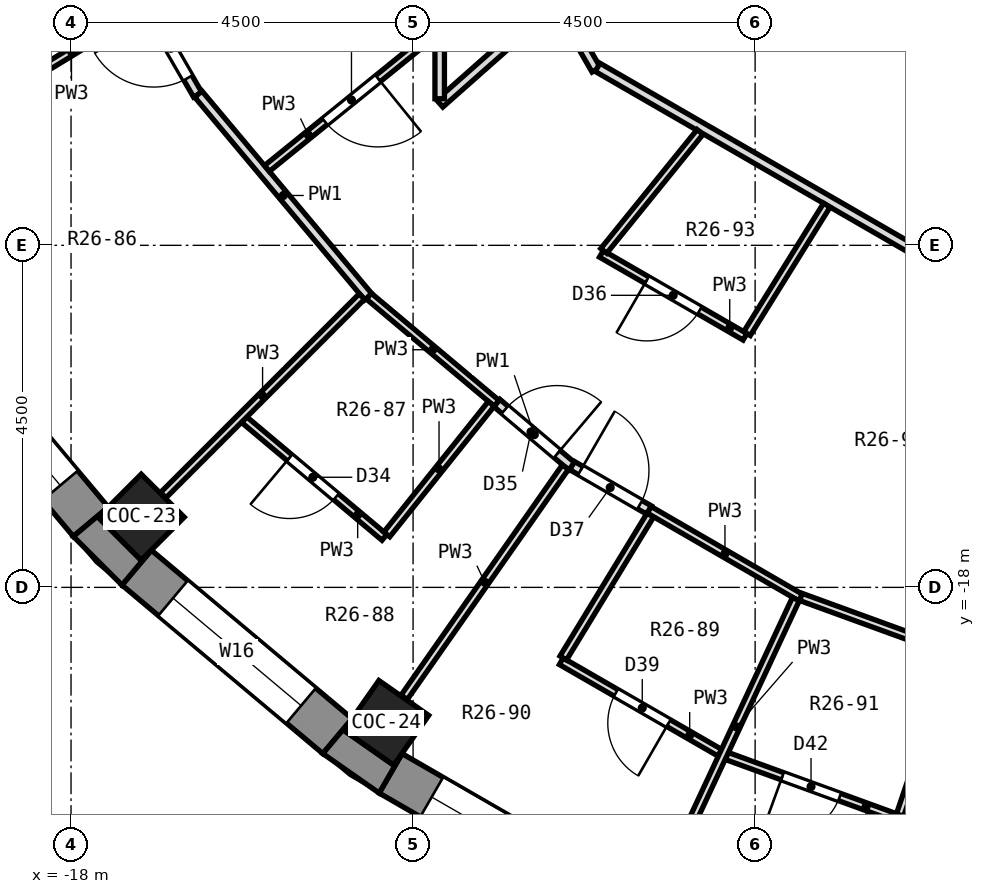
"""IFC4 building model, lengths in metres.
Left out: names, types, materials, properties, quantities, classifications, styles, units other than length and angle.
Written with IfcOpenShell. Run it as: python <this file> out.ifc"""

import sys

from ifc_helpers import new_model, si_unit, direction, frame, frame_2d, origin, origin_2d, place, context, subcontext, project, spatial, polyline, rectangle, outline, extrude, element, fill, save


model = new_model("IFC4")
c1 = context("Model", 3, precision=1e-05, world=origin(), true_north=direction((0.0, 1.0)))
c2 = subcontext(c1, "Body", "Model", "MODEL_VIEW")
j1 = project(units=[si_unit("LENGTHUNIT", "METRE"), si_unit("PLANEANGLEUNIT", "RADIAN")], contexts=[c1])
p1 = place(None, origin())
s1 = spatial("IfcSite", under=j1, at=p1, CompositionType="ELEMENT")
p2 = place(p1, origin())
s2 = spatial("IfcBuilding", under=s1, at=p2, CompositionType="ELEMENT")
p3 = place(p2, frame((0.0, 0.0, 170.7)))
s3 = spatial("IfcBuildingStorey", under=s2, at=p3, CompositionType="ELEMENT", Elevation=170.7)
for number, where, z_axis, x_axis in (
    (1, (-17.077, -17.077, 0.0), (0.0, 0.0, 1.0), (-0.707, -0.707, 0.0)),
    (2, (-13.852, -19.782, 0.0), (0.0, 0.0, 1.0), (-0.574, -0.819, 0.0)),
):
    element("IfcColumn", number, at=place(p3, frame(where, z_axis=z_axis, x_axis=x_axis)), inside=s3, PredefinedType="COLUMN", context=c2, shape_type="SweptSolid", body=[
        extrude(rectangle(XDim=0.8, YDim=0.8, at=origin_2d()), origin(), (0.0, 0.0, 1.0), 3.3),
    ])
p4 = place(p3, frame((-19.957, -14.494, 0.0), z_axis=(0.0, 0.0, 1.0), x_axis=(0.642770398358, -0.766058884809, 0.0)))
e3 = element("IfcWall", 3, at=p4, inside=s3, PredefinedType="SOLIDWALL", context=c2, shape_type="SweptSolid", body=[
    extrude(rectangle(XDim=3.449, YDim=0.6, at=frame_2d((1.725, 0.0))), origin(), (0.0, 0.0, 1.0), 2.85),
])
p5 = place(p4, frame((0.625, 0.0, 0.9)))
e4 = element("IfcOpeningElement", 4, at=p5, cuts=e3, PredefinedType="OPENING", context=c2, shape_type="SweptSolid", body=[
    extrude(rectangle(XDim=2.2, YDim=1.8, at=frame_2d((1.1, 0.9))), frame((0.0, 0.312, 0.0), z_axis=(0.0, -1.0, 0.0), x_axis=(1.0, 0.0, 0.0)), (0.0, 0.0, 1.0), 0.624),
])
p6 = place(p3, frame((-17.137, -17.74, 0.0), z_axis=(0.0, 0.0, 1.0), x_axis=(0.766058884809, -0.642770398358, 0.0)))
e5 = element("IfcWall", 5, at=p6, inside=s3, PredefinedType="SOLIDWALL", context=c2, shape_type="SweptSolid", body=[
    extrude(rectangle(XDim=3.449, YDim=0.6, at=frame_2d((1.725, 0.0))), origin(), (0.0, 0.0, 1.0), 2.85),
])
p7 = place(p6, frame((0.625, 0.0, 0.9)))
e6 = element("IfcOpeningElement", 6, at=p7, cuts=e5, PredefinedType="OPENING", context=c2, shape_type="SweptSolid", body=[
    extrude(rectangle(XDim=2.2, YDim=1.8, at=frame_2d((1.1, 0.9))), frame((0.0, 0.312, 0.0), z_axis=(0.0, -1.0, 0.0), x_axis=(1.0, 0.0, 0.0)), (0.0, 0.0, 1.0), 0.624),
])
p8 = place(p3, frame((-13.796, -20.446, 0.0), z_axis=(0.0, 0.0, 1.0), x_axis=(0.86602648383, -0.499998129301, 0.0)))
e7 = element("IfcWall", 7, at=p8, inside=s3, PredefinedType="SOLIDWALL", context=c2, shape_type="SweptSolid", body=[
    extrude(rectangle(XDim=3.45, YDim=0.6, at=frame_2d((1.725, 0.0))), origin(), (0.0, 0.0, 1.0), 2.85),
])
p9 = place(p8, frame((0.625, 0.0, 0.9)))
e8 = element("IfcOpeningElement", 8, at=p9, cuts=e7, PredefinedType="OPENING", context=c2, shape_type="SweptSolid", body=[
    extrude(rectangle(XDim=2.2, YDim=1.8, at=frame_2d((1.1, 0.9))), frame((0.0, 0.312, 0.0), z_axis=(0.0, -1.0, 0.0), x_axis=(1.0, 0.0, 0.0)), (0.0, 0.0, 1.0), 0.624),
])
p10 = place(p3, origin())
e9 = element("IfcWall", 9, at=p10, inside=s3, PredefinedType="SOLIDWALL", context=c2, shape_type="SweptSolid", body=[
    extrude(outline(polyline([(-17.33, -17.969), (-16.944, -17.51), (-17.077, -17.642), (-17.642, -17.077), (-17.51, -16.944), (-17.969, -17.33), (-17.33, -17.969)])), origin(), (0.0, 0.0, 1.0), 2.85),
])
p11 = place(p3, origin())
e10 = element("IfcWall", 10, at=p11, inside=s3, PredefinedType="SOLIDWALL", context=c2, shape_type="SweptSolid", body=[
    extrude(outline(polyline([(-14.687, -20.187), (-13.946, -20.706), (-13.646, -20.186), (-13.754, -20.34), (-14.409, -19.881), (-14.302, -19.727), (-14.687, -20.187)])), origin(), (0.0, 0.0, 1.0), 2.85),
])
p12 = place(p3, frame((-17.038, -10.299, 0.0), z_axis=(0.0, 0.0, 1.0), x_axis=(0.500147619332, -0.865940158947, 0.0)))
e11 = element("IfcWall", 11, at=p12, inside=s3, PredefinedType="PARTITIONING", context=c2, shape_type="SweptSolid", body=[
    extrude(rectangle(XDim=1.408, YDim=0.125, at=frame_2d((0.704, 0.0))), origin(), (0.0, 0.0, 1.0), 2.85),
])
p13 = place(p12, frame((0.253, 0.0, 0.0)))
e12 = element("IfcOpeningElement", 12, at=p13, cuts=e11, PredefinedType="OPENING", context=c2, shape_type="SweptSolid", body=[
    extrude(rectangle(XDim=0.9, YDim=2.1, at=frame_2d((0.45, 1.05))), frame((0.0, 0.074, 0.0), z_axis=(0.0, -1.0, 0.0), x_axis=(1.0, 0.0, 0.0)), (0.0, 0.0, 1.0), 0.149),
])
p14 = place(p3, frame((-11.617, -10.278, 0.0), z_axis=(0.0, 0.0, 1.0), x_axis=(0.499956751108, -0.866050372104, 0.0)))
e13 = element("IfcWall", 13, at=p14, inside=s3, PredefinedType="PARTITIONING", context=c2, shape_type="SweptSolid", body=[
    extrude(rectangle(XDim=1.052, YDim=0.125, at=frame_2d((0.526, 0.0))), origin(), (0.0, 0.0, 1.0), 2.85),
])
p15 = place(p3, frame((-16.325, -11.511, 0.0), z_axis=(0.0, 0.0, 1.0), x_axis=(0.642416987395, -0.766355279428, 0.0)))
e14 = element("IfcWall", 14, at=p15, inside=s3, PredefinedType="PARTITIONING", context=c2, shape_type="SweptSolid", body=[
    extrude(rectangle(XDim=3.481, YDim=0.125, at=frame_2d((1.74, 0.0))), origin(), (0.0, 0.0, 1.0), 2.85),
])
p16 = place(p3, frame((-12.398, -15.574, 0.0), z_axis=(0.0, 0.0, 1.0), x_axis=(0.763379112729, -0.645950718128, 0.0)))
e15 = element("IfcWall", 15, at=p16, inside=s3, PredefinedType="PARTITIONING", context=c2, shape_type="SweptSolid", body=[
    extrude(rectangle(XDim=1.291, YDim=0.125, at=frame_2d((0.646, 0.0))), origin(), (0.0, 0.0, 1.0), 2.85),
])
p17 = place(p16, frame((0.139, 0.0, 0.0)))
e16 = element("IfcOpeningElement", 16, at=p17, cuts=e15, PredefinedType="OPENING", context=c2, shape_type="SweptSolid", body=[
    extrude(rectangle(XDim=0.9, YDim=2.1, at=frame_2d((0.45, 1.05))), frame((0.0, 0.074, 0.0), z_axis=(0.0, -1.0, 0.0), x_axis=(1.0, 0.0, 0.0)), (0.0, 0.0, 1.0), 0.149),
])
p18 = place(p3, frame((-15.723, -15.793, 0.0), z_axis=(0.0, 0.0, 1.0), x_axis=(0.766024146731, -0.642811797204, 0.0)))
e17 = element("IfcWall", 17, at=p18, inside=s3, PredefinedType="PARTITIONING", context=c2, shape_type="SweptSolid", body=[
    extrude(rectangle(XDim=2.409, YDim=0.1, at=frame_2d((1.205, 0.0))), origin(), (0.0, 0.0, 1.0), 2.85),
])
p19 = place(p18, frame((0.78, 0.0, 0.0)))
e18 = element("IfcOpeningElement", 18, at=p19, cuts=e17, PredefinedType="OPENING", context=c2, shape_type="SweptSolid", body=[
    extrude(rectangle(XDim=0.8, YDim=2.1, at=frame_2d((0.4, 1.05))), frame((0.0, 0.062, 0.0), z_axis=(0.0, -1.0, 0.0), x_axis=(1.0, 0.0, 0.0)), (0.0, 0.0, 1.0), 0.124),
])
p20 = place(p3, frame((-14.081, -14.169, 0.0), z_axis=(0.0, 0.0, 1.0), x_axis=(0.766108401036, -0.642711379907, 0.0)))
e19 = element("IfcWall", 19, at=p20, inside=s3, PredefinedType="PARTITIONING", context=c2, shape_type="SweptSolid", body=[
    extrude(rectangle(XDim=2.192, YDim=0.1, at=frame_2d((1.096, 0.0))), origin(), (0.0, 0.0, 1.0), 2.85),
])
p21 = place(p3, frame((-10.395, -16.979, 0.0), z_axis=(0.0, 0.0, 1.0), x_axis=(0.86526186487, -0.501320162373, 0.0)))
e20 = element("IfcWall", 20, at=p21, inside=s3, PredefinedType="PARTITIONING", context=c2, shape_type="SweptSolid", body=[
    extrude(rectangle(XDim=2.305, YDim=0.1, at=frame_2d((1.152, 0.0))), origin(), (0.0, 0.0, 1.0), 2.85),
])
p22 = place(p3, frame((-11.55, -18.972, 0.0), z_axis=(0.0, 0.0, 1.0), x_axis=(0.866140030745, -0.499801407703, 0.0)))
e21 = element("IfcWall", 21, at=p22, inside=s3, PredefinedType="PARTITIONING", context=c2, shape_type="SweptSolid", body=[
    extrude(rectangle(XDim=2.409, YDim=0.1, at=frame_2d((1.205, 0.0))), origin(), (0.0, 0.0, 1.0), 2.85),
])
p23 = place(p22, frame((0.83, 0.0, 0.0)))
e22 = element("IfcOpeningElement", 22, at=p23, cuts=e21, PredefinedType="OPENING", context=c2, shape_type="SweptSolid", body=[
    extrude(rectangle(XDim=0.8, YDim=2.1, at=frame_2d((0.4, 1.05))), frame((0.0, 0.062, 0.0), z_axis=(0.0, -1.0, 0.0), x_axis=(1.0, 0.0, 0.0)), (0.0, 0.0, 1.0), 0.124),
])
p24 = place(p3, frame((-11.407, -16.398, 0.0), z_axis=(0.0, 0.0, 1.0), x_axis=(0.865955664968, -0.500120771724, 0.0)))
e23 = element("IfcWall", 23, at=p24, inside=s3, PredefinedType="PARTITIONING", context=c2, shape_type="SweptSolid", body=[
    extrude(rectangle(XDim=1.167, YDim=0.125, at=frame_2d((0.583, 0.0))), origin(), (0.0, 0.0, 1.0), 2.85),
])
p25 = place(p24, frame((0.127, 0.0, 0.0)))
e24 = element("IfcOpeningElement", 24, at=p25, cuts=e23, PredefinedType="OPENING", context=c2, shape_type="SweptSolid", body=[
    extrude(rectangle(XDim=0.9, YDim=2.1, at=frame_2d((0.45, 1.05))), frame((0.0, 0.074, 0.0), z_axis=(0.0, -1.0, 0.0), x_axis=(1.0, 0.0, 0.0)), (0.0, 0.0, 1.0), 0.149),
])
p26 = place(p3, frame((-11.023, -13.612, 0.0), z_axis=(0.0, 0.0, 1.0), x_axis=(0.86608684879, -0.499893559023, 0.0)))
e25 = element("IfcWall", 25, at=p26, inside=s3, PredefinedType="PARTITIONING", context=c2, shape_type="SweptSolid", body=[
    extrude(rectangle(XDim=2.182, YDim=0.1, at=frame_2d((1.091, 0.0))), origin(), (0.0, 0.0, 1.0), 2.85),
])
p27 = place(p26, frame((0.691, 0.0, 0.0)))
e26 = element("IfcOpeningElement", 26, at=p27, cuts=e25, PredefinedType="OPENING", context=c2, shape_type="SweptSolid", body=[
    extrude(rectangle(XDim=0.8, YDim=2.1, at=frame_2d((0.4, 1.05))), frame((0.0, 0.062, 0.0), z_axis=(0.0, -1.0, 0.0), x_axis=(1.0, 0.0, 0.0)), (0.0, 0.0, 1.0), 0.124),
])
p28 = place(p3, frame((-11.073, -11.158, 0.0), z_axis=(0.0, 0.0, 1.0), x_axis=(0.865999621737, -0.500044653157, 0.0)))
e27 = element("IfcWall", 27, at=p28, inside=s3, PredefinedType="PARTITIONING", context=c2, shape_type="SweptSolid", body=[
    extrude(rectangle(XDim=8.155, YDim=0.125, at=frame_2d((4.078, 0.0))), origin(), (0.0, 0.0, 1.0), 2.85),
])
p29 = place(p28, frame((5.302, 0.0, 0.0)))
e28 = element("IfcOpeningElement", 28, at=p29, cuts=e27, PredefinedType="OPENING", context=c2, shape_type="SweptSolid", body=[
    extrude(rectangle(XDim=1.0, YDim=2.1, at=frame_2d((0.5, 1.05))), frame((0.0, 0.074, 0.0), z_axis=(0.0, -1.0, 0.0), x_axis=(1.0, 0.0, 0.0)), (0.0, 0.0, 1.0), 0.149),
])
p30 = place(p3, frame((-9.17, -9.255, 0.0), z_axis=(0.0, 0.0, 1.0), x_axis=(0.866034433151, -0.499984360352, 0.0)))
e29 = element("IfcWall", 29, at=p30, inside=s3, PredefinedType="PARTITIONING", context=c2, shape_type="SweptSolid", body=[
    extrude(rectangle(XDim=4.842, YDim=0.125, at=frame_2d((2.421, 0.0))), origin(), (0.0, 0.0, 1.0), 2.85),
])
p31 = place(p30, frame((2.763, 0.0, 0.0)))
e30 = element("IfcOpeningElement", 30, at=p31, cuts=e29, PredefinedType="OPENING", context=c2, shape_type="SweptSolid", body=[
    extrude(rectangle(XDim=1.0, YDim=2.1, at=frame_2d((0.5, 1.05))), frame((0.0, 0.074, 0.0), z_axis=(0.0, -1.0, 0.0), x_axis=(1.0, 0.0, 0.0)), (0.0, 0.0, 1.0), 0.149),
])
p32 = place(p3, frame((-9.373, -20.218, 0.0), z_axis=(0.0, 0.0, 1.0), x_axis=(0.939707598657, -0.34197898916, 0.0)))
e31 = element("IfcWall", 31, at=p32, inside=s3, PredefinedType="PARTITIONING", context=c2, shape_type="SweptSolid", body=[
    extrude(rectangle(XDim=2.409, YDim=0.1, at=frame_2d((1.205, 0.0))), origin(), (0.0, 0.0, 1.0), 2.85),
])
p33 = place(p32, frame((0.78, 0.0, 0.0)))
e32 = element("IfcOpeningElement", 32, at=p33, cuts=e31, PredefinedType="OPENING", context=c2, shape_type="SweptSolid", body=[
    extrude(rectangle(XDim=0.8, YDim=2.1, at=frame_2d((0.4, 1.05))), frame((0.0, 0.062, 0.0), z_axis=(0.0, -1.0, 0.0), x_axis=(1.0, 0.0, 0.0)), (0.0, 0.0, 1.0), 0.124),
])
p34 = place(p3, frame((-8.397, -18.126, 0.0), z_axis=(0.0, 0.0, 1.0), x_axis=(0.939676937302, -0.342063230271, 0.0)))
e33 = element("IfcWall", 33, at=p34, inside=s3, PredefinedType="PARTITIONING", context=c2, shape_type="SweptSolid", body=[
    extrude(rectangle(XDim=2.204, YDim=0.1, at=frame_2d((1.102, 0.0))), origin(), (0.0, 0.0, 1.0), 2.85),
])
p35 = place(p3, frame((-18.928, -11.523, 0.0), z_axis=(0.0, 0.0, 1.0), x_axis=(0.854045436393, 0.520198416545, 0.0)))
e34 = element("IfcWall", 34, at=p35, inside=s3, PredefinedType="PARTITIONING", context=c2, shape_type="SweptSolid", body=[
    extrude(rectangle(XDim=2.187, YDim=0.1, at=frame_2d((1.093, 0.0))), origin(), (0.0, 0.0, 1.0), 2.85),
])
p36 = place(p3, frame((-15.422, -12.489, 0.0), z_axis=(0.0, 0.0, 1.0), x_axis=(0.777201155745, 0.629252225669, 0.0)))
e35 = element("IfcWall", 35, at=p36, inside=s3, PredefinedType="PARTITIONING", context=c2, shape_type="SweptSolid", body=[
    extrude(rectangle(XDim=2.861, YDim=0.1, at=frame_2d((1.431, 0.0))), origin(), (0.0, 0.0, 1.0), 2.85),
])
p37 = place(p36, frame((0.981, 0.0, 0.0)))
e36 = element("IfcOpeningElement", 36, at=p37, cuts=e35, PredefinedType="OPENING", context=c2, shape_type="SweptSolid", body=[
    extrude(rectangle(XDim=0.9, YDim=2.1, at=frame_2d((0.45, 1.05))), frame((0.0, 0.062, 0.0), z_axis=(0.0, -1.0, 0.0), x_axis=(1.0, 0.0, 0.0)), (0.0, 0.0, 1.0), 0.124),
])
p38 = place(p3, frame((-13.15, -11.634, 0.0), z_axis=(0.0, 0.0, 1.0), x_axis=(0.748975424904, 0.662597776098, 0.0)))
e37 = element("IfcWall", 37, at=p38, inside=s3, PredefinedType="PARTITIONING", context=c2, shape_type="SweptSolid", body=[
    extrude(rectangle(XDim=1.984, YDim=0.125, at=frame_2d((0.992, 0.0))), origin(), (0.0, 0.0, 1.0), 2.85),
])
p39 = place(p3, frame((-16.787, -16.787, 0.0), z_axis=(0.0, 0.0, 1.0), x_axis=(0.707106781187, 0.707106781187, 0.0)))
e38 = element("IfcWall", 38, at=p39, inside=s3, PredefinedType="PARTITIONING", context=c2, shape_type="SweptSolid", body=[
    extrude(rectangle(XDim=3.696, YDim=0.1, at=frame_2d((1.848, 0.0))), origin(), (0.0, 0.0, 1.0), 2.85),
])
p40 = place(p3, frame((-10.991, -13.573, 0.0), z_axis=(0.0, 0.0, 1.0), x_axis=(0.629327284659, 0.777140379072, 0.0)))
e39 = element("IfcWall", 39, at=p40, inside=s3, PredefinedType="PARTITIONING", context=c2, shape_type="SweptSolid", body=[
    extrude(rectangle(XDim=2.013, YDim=0.1, at=frame_2d((1.007, 0.0))), origin(), (0.0, 0.0, 1.0), 2.85),
])
p41 = place(p3, frame((-13.846, -17.303, 0.0), z_axis=(0.0, 0.0, 1.0), x_axis=(0.624722111344, 0.780847157642, 0.0)))
e40 = element("IfcWall", 40, at=p41, inside=s3, PredefinedType="PARTITIONING", context=c2, shape_type="SweptSolid", body=[
    extrude(rectangle(XDim=2.2, YDim=0.1, at=frame_2d((1.1, 0.0))), origin(), (0.0, 0.0, 1.0), 2.85),
])
p42 = place(p3, frame((-13.617, -19.447, 0.0), z_axis=(0.0, 0.0, 1.0), x_axis=(0.573515531974, 0.819194686619, 0.0)))
e41 = element("IfcWall", 41, at=p42, inside=s3, PredefinedType="PARTITIONING", context=c2, shape_type="SweptSolid", body=[
    extrude(rectangle(XDim=3.697, YDim=0.1, at=frame_2d((1.848, 0.0))), origin(), (0.0, 0.0, 1.0), 2.85),
])
p43 = place(p3, frame((-9.107, -14.661, 0.0), z_axis=(0.0, 0.0, 1.0), x_axis=(0.528010719156, 0.849237705508, 0.0)))
e42 = element("IfcWall", 42, at=p43, inside=s3, PredefinedType="PARTITIONING", context=c2, shape_type="SweptSolid", body=[
    extrude(rectangle(XDim=1.988, YDim=0.1, at=frame_2d((0.994, 0.0))), origin(), (0.0, 0.0, 1.0), 2.85),
])
p44 = place(p3, frame((-11.524, -18.929, 0.0), z_axis=(0.0, 0.0, 1.0), x_axis=(0.520291802012, 0.853988548377, 0.0)))
e43 = element("IfcWall", 43, at=p44, inside=s3, PredefinedType="PARTITIONING", context=c2, shape_type="SweptSolid", body=[
    extrude(rectangle(XDim=2.201, YDim=0.1, at=frame_2d((1.1, 0.0))), origin(), (0.0, 0.0, 1.0), 2.85),
])
p45 = place(p3, frame((-10.034, -21.515, 0.0), z_axis=(0.0, 0.0, 1.0), x_axis=(0.423040405982, 0.906110818226, 0.0)))
e44 = element("IfcWall", 44, at=p45, inside=s3, PredefinedType="PARTITIONING", context=c2, shape_type="SweptSolid", body=[
    extrude(rectangle(XDim=3.709, YDim=0.1, at=frame_2d((1.854, 0.0))), origin(), (0.0, 0.0, 1.0), 2.85),
])
p46 = place(p3, frame((-7.093, -20.995, 0.0), z_axis=(0.0, 0.0, 1.0), x_axis=(0.320053851591, 0.947399351953, 0.0)))
e45 = element("IfcWall", 45, at=p46, inside=s3, PredefinedType="PARTITIONING", context=c2, shape_type="SweptSolid", body=[
    extrude(rectangle(XDim=2.2, YDim=0.1, at=frame_2d((1.1, 0.0))), origin(), (0.0, 0.0, 1.0), 2.85),
])
p47 = place(p3, frame((-13.15, -11.572, 0.0), z_axis=(0.0, 0.0, 1.0), x_axis=(0.0, 1.0, 0.0)))
e46 = element("IfcWall", 46, at=p47, inside=s3, PredefinedType="PARTITIONING", context=c2, shape_type="SweptSolid", body=[
    extrude(rectangle(XDim=2.221, YDim=0.125, at=frame_2d((1.111, 0.0))), origin(), (0.0, 0.0, 1.0), 2.85),
])
p48 = place(p5, origin())
e47 = element("IfcWindow", 47, at=p48, inside=s3, PartitioningType="SINGLE_PANEL", PredefinedType="WINDOW", context=c2, shape_type="SweptSolid", body=[
    extrude(rectangle(XDim=2.2, YDim=1.8, at=frame_2d((1.1, 0.9))), frame((0.0, 0.18, 0.0), z_axis=(0.0, -1.0, 0.0), x_axis=(1.0, 0.0, 0.0)), (0.0, 0.0, 1.0), 0.06),
])
fill(e4, e47)
p49 = place(p7, origin())
e48 = element("IfcWindow", 48, at=p49, inside=s3, PartitioningType="SINGLE_PANEL", PredefinedType="WINDOW", context=c2, shape_type="SweptSolid", body=[
    extrude(rectangle(XDim=2.2, YDim=1.8, at=frame_2d((1.1, 0.9))), frame((0.0, 0.18, 0.0), z_axis=(0.0, -1.0, 0.0), x_axis=(1.0, 0.0, 0.0)), (0.0, 0.0, 1.0), 0.06),
])
fill(e6, e48)
p50 = place(p9, origin())
e49 = element("IfcWindow", 49, at=p50, inside=s3, PartitioningType="SINGLE_PANEL", PredefinedType="WINDOW", context=c2, shape_type="SweptSolid", body=[
    extrude(rectangle(XDim=2.2, YDim=1.8, at=frame_2d((1.1, 0.9))), frame((0.0, 0.18, 0.0), z_axis=(0.0, -1.0, 0.0), x_axis=(1.0, 0.0, 0.0)), (0.0, 0.0, 1.0), 0.06),
])
fill(e8, e49)
p51 = place(p13, frame((0.9, 0.0, 0.0), z_axis=(0.0, 0.0, 1.0), x_axis=(-1.0, 0.0, 0.0)))
e50 = element("IfcDoor", 50, at=p51, inside=s3, OperationType="SINGLE_SWING_RIGHT", PredefinedType="DOOR", context=c2, shape_type="SweptSolid", body=[
    extrude(rectangle(XDim=0.9, YDim=2.1, at=frame_2d((0.45, 1.05))), frame((0.0, 0.025, 0.0), z_axis=(0.0, -1.0, 0.0), x_axis=(1.0, 0.0, 0.0)), (0.0, 0.0, 1.0), 0.05),
])
fill(e12, e50)
p52 = place(p37, frame((0.9, 0.0, 0.0), z_axis=(0.0, 0.0, 1.0), x_axis=(-1.0, 0.0, 0.0)))
e51 = element("IfcDoor", 51, at=p52, inside=s3, OperationType="SINGLE_SWING_LEFT", PredefinedType="DOOR", context=c2, shape_type="SweptSolid", body=[
    extrude(rectangle(XDim=0.9, YDim=2.1, at=frame_2d((0.45, 1.05))), frame((0.0, 0.025, 0.0), z_axis=(0.0, -1.0, 0.0), x_axis=(1.0, 0.0, 0.0)), (0.0, 0.0, 1.0), 0.05),
])
fill(e36, e51)
p53 = place(p19, frame((0.8, 0.0, 0.0), z_axis=(0.0, 0.0, 1.0), x_axis=(-1.0, 0.0, 0.0)))
e52 = element("IfcDoor", 52, at=p53, inside=s3, OperationType="SINGLE_SWING_RIGHT", PredefinedType="DOOR", context=c2, shape_type="SweptSolid", body=[
    extrude(rectangle(XDim=0.8, YDim=2.1, at=frame_2d((0.4, 1.05))), frame((0.0, 0.025, 0.0), z_axis=(0.0, -1.0, 0.0), x_axis=(1.0, 0.0, 0.0)), (0.0, 0.0, 1.0), 0.05),
])
fill(e18, e52)
p54 = place(p17, origin())
e53 = element("IfcDoor", 53, at=p54, inside=s3, OperationType="SINGLE_SWING_RIGHT", PredefinedType="DOOR", context=c2, shape_type="SweptSolid", body=[
    extrude(rectangle(XDim=0.9, YDim=2.1, at=frame_2d((0.45, 1.05))), frame((0.0, 0.025, 0.0), z_axis=(0.0, -1.0, 0.0), x_axis=(1.0, 0.0, 0.0)), (0.0, 0.0, 1.0), 0.05),
])
fill(e16, e53)
p55 = place(p27, frame((0.8, 0.0, 0.0), z_axis=(0.0, 0.0, 1.0), x_axis=(-1.0, 0.0, 0.0)))
e54 = element("IfcDoor", 54, at=p55, inside=s3, OperationType="SINGLE_SWING_RIGHT", PredefinedType="DOOR", context=c2, shape_type="SweptSolid", body=[
    extrude(rectangle(XDim=0.8, YDim=2.1, at=frame_2d((0.4, 1.05))), frame((0.0, 0.025, 0.0), z_axis=(0.0, -1.0, 0.0), x_axis=(1.0, 0.0, 0.0)), (0.0, 0.0, 1.0), 0.05),
])
fill(e26, e54)
p56 = place(p25, origin())
e55 = element("IfcDoor", 55, at=p56, inside=s3, OperationType="SINGLE_SWING_LEFT", PredefinedType="DOOR", context=c2, shape_type="SweptSolid", body=[
    extrude(rectangle(XDim=0.9, YDim=2.1, at=frame_2d((0.45, 1.05))), frame((0.0, 0.025, 0.0), z_axis=(0.0, -1.0, 0.0), x_axis=(1.0, 0.0, 0.0)), (0.0, 0.0, 1.0), 0.05),
])
fill(e24, e55)
p57 = place(p23, frame((0.8, 0.0, 0.0), z_axis=(0.0, 0.0, 1.0), x_axis=(-1.0, 0.0, 0.0)))
e56 = element("IfcDoor", 56, at=p57, inside=s3, OperationType="SINGLE_SWING_LEFT", PredefinedType="DOOR", context=c2, shape_type="SweptSolid", body=[
    extrude(rectangle(XDim=0.8, YDim=2.1, at=frame_2d((0.4, 1.05))), frame((0.0, 0.025, 0.0), z_axis=(0.0, -1.0, 0.0), x_axis=(1.0, 0.0, 0.0)), (0.0, 0.0, 1.0), 0.05),
])
fill(e22, e56)
p58 = place(p33, frame((0.8, 0.0, 0.0), z_axis=(0.0, 0.0, 1.0), x_axis=(-1.0, 0.0, 0.0)))
e57 = element("IfcDoor", 57, at=p58, inside=s3, OperationType="SINGLE_SWING_RIGHT", PredefinedType="DOOR", context=c2, shape_type="SweptSolid", body=[
    extrude(rectangle(XDim=0.8, YDim=2.1, at=frame_2d((0.4, 1.05))), frame((0.0, 0.025, 0.0), z_axis=(0.0, -1.0, 0.0), x_axis=(1.0, 0.0, 0.0)), (0.0, 0.0, 1.0), 0.05),
])
fill(e32, e57)
save(model, sys.argv[1])
